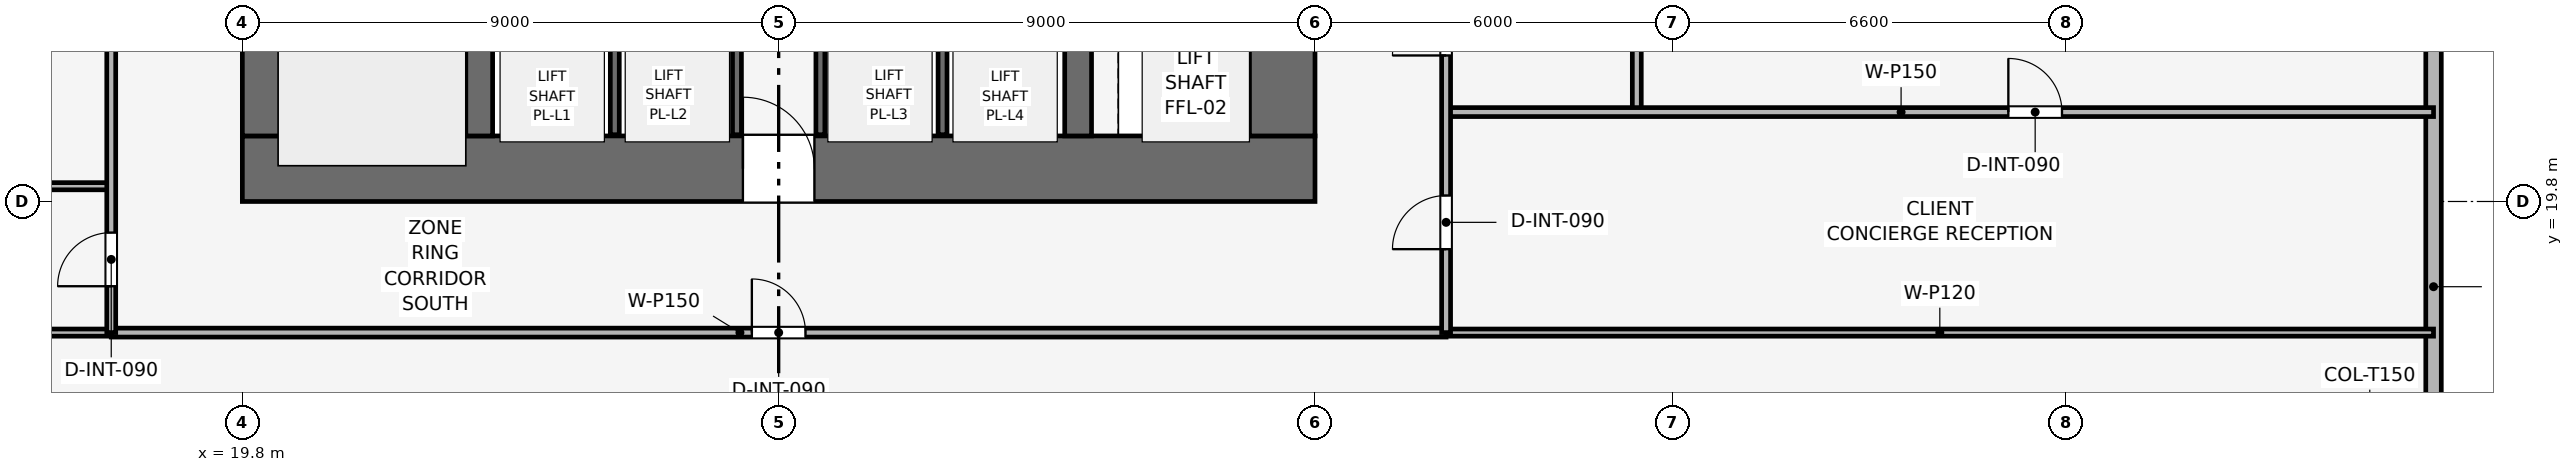
"""IFC4 building model, lengths in metres.
Left out: names, types, materials, properties, quantities, classifications, styles, units other than length and angle.
Written with IfcOpenShell. Run it as: python <this file> out.ifc"""

import sys

from ifc_helpers import new_model, si_unit, direction, frame, frame_2d, origin, place, context, subcontext, project, spatial, rectangle, extrude, element, fill, save


model = new_model("IFC4")
c1 = context("Model", 3, precision=1e-05, world=origin(), true_north=direction((0.0, 1.0)))
c2 = subcontext(c1, "Body", "Model", "MODEL_VIEW")
j1 = project(units=[si_unit("LENGTHUNIT", "METRE"), si_unit("PLANEANGLEUNIT", "RADIAN")], contexts=[c1])
p1 = place(None, origin())
s1 = spatial("IfcSite", under=j1, at=p1, CompositionType="ELEMENT")
p2 = place(p1, origin())
s2 = spatial("IfcBuilding", under=s1, at=p2, CompositionType="ELEMENT")
p3 = place(p2, frame((0.0, 0.0, 72.9)))
s3 = spatial("IfcBuildingStorey", under=s2, at=p3, CompositionType="ELEMENT", Elevation=72.9)
p4 = place(p3, frame((19.8, 20.35, 0.0), z_axis=(0.0, 0.0, 1.0), x_axis=(1.0, 0.0, 0.0)))
e1 = element("IfcWall", 1, at=p4, inside=s3, PredefinedType="SHEAR", context=c2, shape_type="SweptSolid", body=[
    extrude(rectangle(XDim=18.0, YDim=1.1, at=frame_2d((9.0, 0.0))), origin(), (0.0, 0.0, 1.0), 3.9),
])
p5 = place(p4, frame((8.4, 0.0, 0.0)))
e2 = element("IfcOpeningElement", 2, at=p5, cuts=e1, PredefinedType="OPENING", context=c2, shape_type="SweptSolid", body=[
    extrude(rectangle(XDim=1.2, YDim=2.2, at=frame_2d((0.6, 1.1))), frame((0.0, 0.56, 0.0), z_axis=(0.0, -1.0, 0.0), x_axis=(1.0, 0.0, 0.0)), (0.0, 0.0, 1.0), 1.12),
])
p6 = place(p3, frame((20.35, 20.9, 0.0), z_axis=(0.0, 0.0, 1.0), x_axis=(0.0, 1.0, 0.0)))
e3 = element("IfcWall", 3, at=p6, inside=s3, PredefinedType="SHEAR", context=c2, shape_type="SweptSolid", body=[
    extrude(rectangle(XDim=15.8, YDim=1.1, at=frame_2d((7.9, 0.0))), origin(), (0.0, 0.0, 1.0), 3.9),
])
p7 = place(p6, frame((9.9, 0.0, 0.0)))
e4 = element("IfcOpeningElement", 4, at=p7, cuts=e3, PredefinedType="OPENING", context=c2, shape_type="SweptSolid", body=[
    extrude(rectangle(XDim=1.1, YDim=2.15, at=frame_2d((0.55, 1.075))), frame((0.0, 0.56, 0.0), z_axis=(0.0, -1.0, 0.0), x_axis=(1.0, 0.0, 0.0)), (0.0, 0.0, 1.0), 1.12),
])
p8 = place(p3, frame((37.25, 20.9, 0.0), z_axis=(0.0, 0.0, 1.0), x_axis=(0.0, 1.0, 0.0)))
e5 = element("IfcWall", 5, at=p8, inside=s3, PredefinedType="SHEAR", context=c2, shape_type="SweptSolid", body=[
    extrude(rectangle(XDim=15.8, YDim=1.1, at=frame_2d((7.9, 0.0))), origin(), (0.0, 0.0, 1.0), 3.9),
])
p9 = place(p8, frame((4.4, 0.0, 0.0)))
e6 = element("IfcOpeningElement", 6, at=p9, cuts=e5, PredefinedType="OPENING", context=c2, shape_type="SweptSolid", body=[
    extrude(rectangle(XDim=1.1, YDim=2.15, at=frame_2d((0.55, 1.075))), frame((0.0, 0.56, 0.0), z_axis=(0.0, -1.0, 0.0), x_axis=(1.0, 0.0, 0.0)), (0.0, 0.0, 1.0), 1.12),
])
for number, where, z_axis, x_axis in (
    (7, (23.775, 20.9, 0.0), (0.0, 0.0, 1.0), (0.0, 1.0, 0.0)),
    (8, (33.825, 20.9, 0.0), (0.0, 0.0, 1.0), (0.0, 1.0, 0.0)),
):
    element("IfcWall", number, at=place(p3, frame(where, z_axis=z_axis, x_axis=x_axis)), inside=s3, PredefinedType="SHEAR", context=c2, shape_type="SweptSolid", body=[
        extrude(rectangle(XDim=15.8, YDim=0.45, at=frame_2d((7.9, 0.0))), origin(), (0.0, 0.0, 1.0), 3.9),
    ])
p10 = place(p3, frame((56.57, 24.0, 0.0), z_axis=(0.0, 0.0, 1.0), x_axis=(0.0, -1.0, 0.0)))
e9 = element("IfcWall", 9, at=p10, inside=s3, PredefinedType="SOLIDWALL", context=c2, shape_type="SweptSolid", body=[
    extrude(rectangle(XDim=15.3, YDim=0.26, at=frame_2d((7.65, 0.0))), origin(), (0.0, 0.0, 1.0), 3.65),
])
p11 = place(p10, frame((11.25, 0.0, 0.9)))
e10 = element("IfcOpeningElement", 10, at=p11, cuts=e9, PredefinedType="OPENING", context=c2, shape_type="SweptSolid", body=[
    extrude(rectangle(XDim=3.8, YDim=1.9, at=frame_2d((1.9, 0.95))), frame((0.0, 0.14, 0.0), z_axis=(0.0, -1.0, 0.0), x_axis=(1.0, 0.0, 0.0)), (0.0, 0.0, 1.0), 0.28),
])
for number, where, z_axis, x_axis in (
    (11, (26.05, 20.92, 0.0), (0.0, 0.0, 1.0), (0.0, 1.0, 0.0)),
    (12, (28.1, 20.92, 0.0), (0.0, 0.0, 1.0), (0.0, 1.0, 0.0)),
    (13, (29.5, 20.92, 0.0), (0.0, 0.0, 1.0), (0.0, 1.0, 0.0)),
    (14, (31.55, 20.92, 0.0), (0.0, 0.0, 1.0), (0.0, 1.0, 0.0)),
):
    element("IfcWall", number, at=place(p3, frame(where, z_axis=z_axis, x_axis=x_axis)), inside=s3, PredefinedType="SHEAR", context=c2, shape_type="SweptSolid", body=[
        extrude(rectangle(XDim=2.06, YDim=0.15, at=frame_2d((1.03, 0.0))), origin(), (0.0, 0.0, 1.0), 3.65),
    ])
for number, where, z_axis, x_axis in (
    (15, (1.03, 17.6, 0.0), (0.0, 0.0, 1.0), (1.0, 0.0, 0.0)),
    (16, (40.0, 17.6, 0.0), (0.0, 0.0, 1.0), (1.0, 0.0, 0.0)),
    (17, (1.03, 20.056, 0.0), (0.0, 0.0, 1.0), (1.0, 0.0, 0.0)),
):
    element("IfcWall", number, at=place(p3, frame(where, z_axis=z_axis, x_axis=x_axis)), inside=s3, PredefinedType="PARTITIONING", context=c2, shape_type="SweptSolid", body=[
        extrude(rectangle(XDim=16.57, YDim=0.12, at=frame_2d((8.285, 0.0))), origin(), (0.0, 0.0, 1.0), 2.935),
    ])
p12 = place(p3, frame((43.2, 21.3, 0.0), z_axis=(0.0, 0.0, 1.0), x_axis=(0.0, 1.0, 0.0)))
e18 = element("IfcWall", 18, at=p12, inside=s3, PredefinedType="PARTITIONING", context=c2, shape_type="SweptSolid", body=[
    extrude(rectangle(XDim=8.4, YDim=0.15, at=frame_2d((4.2, 0.0))), origin(), (0.0, 0.0, 1.0), 3.085),
])
p13 = place(p3, frame((40.0, 21.3, 0.0), z_axis=(0.0, 0.0, 1.0), x_axis=(1.0, 0.0, 0.0)))
e19 = element("IfcWall", 19, at=p13, inside=s3, PredefinedType="PARTITIONING", context=c2, shape_type="SweptSolid", body=[
    extrude(rectangle(XDim=16.57, YDim=0.15, at=frame_2d((8.285, 0.0))), origin(), (0.0, 0.0, 1.0), 2.935),
])
p14 = place(p13, frame((9.435, 0.0, 0.0)))
e20 = element("IfcOpeningElement", 20, at=p14, cuts=e19, PredefinedType="OPENING", context=c2, shape_type="SweptSolid", body=[
    extrude(rectangle(XDim=0.9, YDim=2.1, at=frame_2d((0.45, 1.05))), frame((0.0, 0.085, 0.0), z_axis=(0.0, -1.0, 0.0), x_axis=(1.0, 0.0, 0.0)), (0.0, 0.0, 1.0), 0.17),
])
p15 = place(p3, frame((17.6, 17.6, 0.0), z_axis=(0.0, 0.0, 1.0), x_axis=(1.0, 0.0, 0.0)))
e21 = element("IfcWall", 21, at=p15, inside=s3, PredefinedType="PARTITIONING", context=c2, shape_type="SweptSolid", body=[
    extrude(rectangle(XDim=22.4, YDim=0.15, at=frame_2d((11.2, 0.0))), origin(), (0.0, 0.0, 1.0), 3.085),
])
p16 = place(p15, frame((10.75, 0.0, 0.0)))
e22 = element("IfcOpeningElement", 22, at=p16, cuts=e21, PredefinedType="OPENING", context=c2, shape_type="SweptSolid", body=[
    extrude(rectangle(XDim=0.9, YDim=2.1, at=frame_2d((0.45, 1.05))), frame((0.0, 0.085, 0.0), z_axis=(0.0, -1.0, 0.0), x_axis=(1.0, 0.0, 0.0)), (0.0, 0.0, 1.0), 0.17),
])
p17 = place(p3, frame((17.6, 17.6, 0.0), z_axis=(0.0, 0.0, 1.0), x_axis=(0.0, 1.0, 0.0)))
e23 = element("IfcWall", 23, at=p17, inside=s3, PredefinedType="PARTITIONING", context=c2, shape_type="SweptSolid", body=[
    extrude(rectangle(XDim=22.4, YDim=0.15, at=frame_2d((11.2, 0.0))), origin(), (0.0, 0.0, 1.0), 3.085),
])
p18 = place(p17, frame((0.778, 0.0, 0.0)))
e24 = element("IfcOpeningElement", 24, at=p18, cuts=e23, PredefinedType="OPENING", context=c2, shape_type="SweptSolid", body=[
    extrude(rectangle(XDim=0.9, YDim=2.1, at=frame_2d((0.45, 1.05))), frame((0.0, 0.085, 0.0), z_axis=(0.0, -1.0, 0.0), x_axis=(1.0, 0.0, 0.0)), (0.0, 0.0, 1.0), 0.17),
])
p19 = place(p17, frame((6.372, 0.0, 0.0)))
e25 = element("IfcOpeningElement", 25, at=p19, cuts=e23, PredefinedType="OPENING", context=c2, shape_type="SweptSolid", body=[
    extrude(rectangle(XDim=0.9, YDim=2.1, at=frame_2d((0.45, 1.05))), frame((0.0, 0.085, 0.0), z_axis=(0.0, -1.0, 0.0), x_axis=(1.0, 0.0, 0.0)), (0.0, 0.0, 1.0), 0.17),
])
p20 = place(p17, frame((16.343, 0.0, 0.0)))
e26 = element("IfcOpeningElement", 26, at=p20, cuts=e23, PredefinedType="OPENING", context=c2, shape_type="SweptSolid", body=[
    extrude(rectangle(XDim=0.9, YDim=2.1, at=frame_2d((0.45, 1.05))), frame((0.0, 0.085, 0.0), z_axis=(0.0, -1.0, 0.0), x_axis=(1.0, 0.0, 0.0)), (0.0, 0.0, 1.0), 0.17),
])
p21 = place(p3, frame((40.0, 17.6, 0.0), z_axis=(0.0, 0.0, 1.0), x_axis=(0.0, 1.0, 0.0)))
e27 = element("IfcWall", 27, at=p21, inside=s3, PredefinedType="PARTITIONING", context=c2, shape_type="SweptSolid", body=[
    extrude(rectangle(XDim=22.4, YDim=0.15, at=frame_2d((11.2, 0.0))), origin(), (0.0, 0.0, 1.0), 3.085),
])
p22 = place(p21, frame((1.4, 0.0, 0.0)))
e28 = element("IfcOpeningElement", 28, at=p22, cuts=e27, PredefinedType="OPENING", context=c2, shape_type="SweptSolid", body=[
    extrude(rectangle(XDim=0.9, YDim=2.1, at=frame_2d((0.45, 1.05))), frame((0.0, 0.085, 0.0), z_axis=(0.0, -1.0, 0.0), x_axis=(1.0, 0.0, 0.0)), (0.0, 0.0, 1.0), 0.17),
])
p23 = place(p21, frame((4.65, 0.0, 0.0)))
e29 = element("IfcOpeningElement", 29, at=p23, cuts=e27, PredefinedType="OPENING", context=c2, shape_type="SweptSolid", body=[
    extrude(rectangle(XDim=0.9, YDim=2.1, at=frame_2d((0.45, 1.05))), frame((0.0, 0.085, 0.0), z_axis=(0.0, -1.0, 0.0), x_axis=(1.0, 0.0, 0.0)), (0.0, 0.0, 1.0), 0.17),
])
p24 = place(p21, frame((7.55, 0.0, 0.0)))
e30 = element("IfcOpeningElement", 30, at=p24, cuts=e27, PredefinedType="OPENING", context=c2, shape_type="SweptSolid", body=[
    extrude(rectangle(XDim=0.9, YDim=2.1, at=frame_2d((0.45, 1.05))), frame((0.0, 0.085, 0.0), z_axis=(0.0, -1.0, 0.0), x_axis=(1.0, 0.0, 0.0)), (0.0, 0.0, 1.0), 0.17),
])
p25 = place(p21, frame((10.3, 0.0, 0.0)))
e31 = element("IfcOpeningElement", 31, at=p25, cuts=e27, PredefinedType="OPENING", context=c2, shape_type="SweptSolid", body=[
    extrude(rectangle(XDim=0.95, YDim=2.1, at=frame_2d((0.475, 1.05))), frame((0.0, 0.085, 0.0), z_axis=(0.0, -1.0, 0.0), x_axis=(1.0, 0.0, 0.0)), (0.0, 0.0, 1.0), 0.17),
])
p26 = place(p21, frame((16.8, 0.0, 0.0)))
e32 = element("IfcOpeningElement", 32, at=p26, cuts=e27, PredefinedType="OPENING", context=c2, shape_type="SweptSolid", body=[
    extrude(rectangle(XDim=0.9, YDim=2.1, at=frame_2d((0.45, 1.05))), frame((0.0, 0.085, 0.0), z_axis=(0.0, -1.0, 0.0), x_axis=(1.0, 0.0, 0.0)), (0.0, 0.0, 1.0), 0.17),
])
p27 = place(p14, origin())
e33 = element("IfcDoor", 33, at=p27, inside=s3, OperationType="SINGLE_SWING_LEFT", PredefinedType="DOOR", context=c2, shape_type="SweptSolid", body=[
    extrude(rectangle(XDim=0.9, YDim=2.1, at=frame_2d((0.45, 1.05))), frame((0.0, 0.025, 0.0), z_axis=(0.0, -1.0, 0.0), x_axis=(1.0, 0.0, 0.0)), (0.0, 0.0, 1.0), 0.05),
])
fill(e20, e33)
p28 = place(p16, origin())
e34 = element("IfcDoor", 34, at=p28, inside=s3, OperationType="SINGLE_SWING_LEFT", PredefinedType="DOOR", context=c2, shape_type="SweptSolid", body=[
    extrude(rectangle(XDim=0.9, YDim=2.1, at=frame_2d((0.45, 1.05))), frame((0.0, 0.025, 0.0), z_axis=(0.0, -1.0, 0.0), x_axis=(1.0, 0.0, 0.0)), (0.0, 0.0, 1.0), 0.05),
])
fill(e22, e34)
p29 = place(p18, origin())
e35 = element("IfcDoor", 35, at=p29, inside=s3, OperationType="SINGLE_SWING_LEFT", PredefinedType="DOOR", context=c2, shape_type="SweptSolid", body=[
    extrude(rectangle(XDim=0.9, YDim=2.1, at=frame_2d((0.45, 1.05))), frame((0.0, 0.025, 0.0), z_axis=(0.0, -1.0, 0.0), x_axis=(1.0, 0.0, 0.0)), (0.0, 0.0, 1.0), 0.05),
])
fill(e24, e35)
p30 = place(p22, origin())
e36 = element("IfcDoor", 36, at=p30, inside=s3, OperationType="SINGLE_SWING_LEFT", PredefinedType="DOOR", context=c2, shape_type="SweptSolid", body=[
    extrude(rectangle(XDim=0.9, YDim=2.1, at=frame_2d((0.45, 1.05))), frame((0.0, 0.025, 0.0), z_axis=(0.0, -1.0, 0.0), x_axis=(1.0, 0.0, 0.0)), (0.0, 0.0, 1.0), 0.05),
])
fill(e28, e36)
p31 = place(p23, origin())
e37 = element("IfcDoor", 37, at=p31, inside=s3, OperationType="SINGLE_SWING_LEFT", PredefinedType="DOOR", context=c2, shape_type="SweptSolid", body=[
    extrude(rectangle(XDim=0.9, YDim=2.1, at=frame_2d((0.45, 1.05))), frame((0.0, 0.025, 0.0), z_axis=(0.0, -1.0, 0.0), x_axis=(1.0, 0.0, 0.0)), (0.0, 0.0, 1.0), 0.05),
])
fill(e29, e37)
p32 = place(p5, origin())
e38 = element("IfcDoor", 38, at=p32, inside=s3, OperationType="SINGLE_SWING_LEFT", PredefinedType="DOOR", context=c2, shape_type="SweptSolid", body=[
    extrude(rectangle(XDim=1.2, YDim=2.2, at=frame_2d((0.6, 1.1))), frame((0.0, 0.025, 0.0), z_axis=(0.0, -1.0, 0.0), x_axis=(1.0, 0.0, 0.0)), (0.0, 0.0, 1.0), 0.05),
])
fill(e2, e38)
save(model, sys.argv[1])
